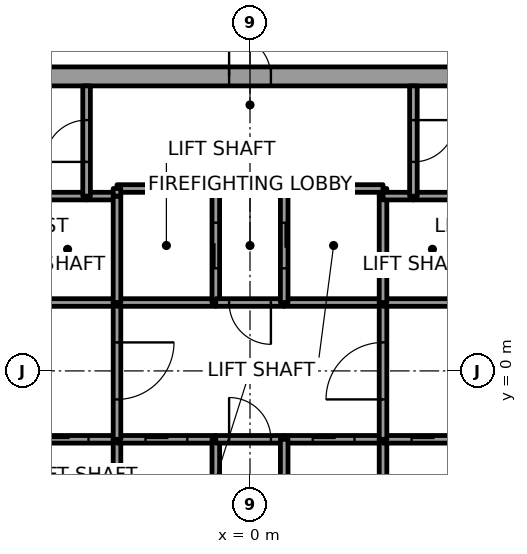
"""IFC4 building model, lengths in metres.
Left out: names, types, materials, properties, quantities, classifications, styles, units other than length and angle.
Written with IfcOpenShell. Run it as: python <this file> out.ifc"""

import sys

from ifc_helpers import new_model, si_unit, direction, frame, frame_2d, origin, place, context, subcontext, project, spatial, rectangle, extrude, element, fill, save


model = new_model("IFC4")
c1 = context("Model", 3, precision=1e-05, world=origin(), true_north=direction((0.0, 1.0)))
c2 = subcontext(c1, "Body", "Model", "MODEL_VIEW")
j1 = project(units=[si_unit("LENGTHUNIT", "METRE"), si_unit("PLANEANGLEUNIT", "RADIAN")], contexts=[c1])
p1 = place(None, origin())
s1 = spatial("IfcSite", under=j1, at=p1, CompositionType="ELEMENT")
p2 = place(p1, origin())
s2 = spatial("IfcBuilding", under=s1, at=p2, CompositionType="ELEMENT")
p3 = place(p2, frame((0.0, 0.0, 99.8)))
s3 = spatial("IfcBuildingStorey", under=s2, at=p3, CompositionType="ELEMENT", Elevation=99.8)
p4 = place(p3, frame((-11.0, 7.75, 0.0), z_axis=(0.0, 0.0, 1.0), x_axis=(1.0, 0.0, 0.0)))
e1 = element("IfcWall", 1, at=p4, inside=s3, PredefinedType="SHEAR", context=c2, shape_type="SweptSolid", body=[
    extrude(rectangle(XDim=22.0, YDim=0.5, at=frame_2d((11.0, 0.0))), origin(), (0.0, 0.0, 1.0), 3.7),
])
p5 = place(p4, frame((10.45, 0.0, 0.0)))
e2 = element("IfcOpeningElement", 2, at=p5, cuts=e1, PredefinedType="OPENING", context=c2, shape_type="SweptSolid", body=[
    extrude(rectangle(XDim=1.1, YDim=2.1, at=frame_2d((0.55, 1.05))), frame((0.0, 0.25, 0.0), z_axis=(0.0, -1.0, 0.0), x_axis=(1.0, 0.0, 0.0)), (0.0, 0.0, 1.0), 0.5),
])
p6 = place(p3, frame((-6.1, -1.8, 0.0), z_axis=(0.0, 0.0, 1.0), x_axis=(1.0, 0.0, 0.0)))
e3 = element("IfcWall", 3, at=p6, inside=s3, PredefinedType="SOLIDWALL", context=c2, shape_type="SweptSolid", body=[
    extrude(rectangle(XDim=2.6, YDim=0.2, at=frame_2d((1.3, 0.0))), origin(), (0.0, 0.0, 1.0), 3.55),
])
p7 = place(p6, frame((0.75, 0.0, 0.0)))
e4 = element("IfcOpeningElement", 4, at=p7, cuts=e3, PredefinedType="OPENING", context=c2, shape_type="SweptSolid", body=[
    extrude(rectangle(XDim=1.1, YDim=2.1, at=frame_2d((0.55, 1.05))), frame((0.0, 0.1, 0.0), z_axis=(0.0, -1.0, 0.0), x_axis=(1.0, 0.0, 0.0)), (0.0, 0.0, 1.0), 0.2),
])
p8 = place(p3, frame((-3.5, 1.8, 0.0), z_axis=(0.0, 0.0, 1.0), x_axis=(-1.0, 0.0, 0.0)))
e5 = element("IfcWall", 5, at=p8, inside=s3, PredefinedType="SOLIDWALL", context=c2, shape_type="SweptSolid", body=[
    extrude(rectangle(XDim=2.6, YDim=0.2, at=frame_2d((1.3, 0.0))), origin(), (0.0, 0.0, 1.0), 3.55),
])
p9 = place(p3, frame((-4.3, 4.6, 0.0), z_axis=(0.0, 0.0, 1.0), x_axis=(-1.0, 0.0, 0.0)))
e6 = element("IfcWall", 6, at=p9, inside=s3, PredefinedType="SOLIDWALL", context=c2, shape_type="SweptSolid", body=[
    extrude(rectangle(XDim=1.8, YDim=0.2, at=frame_2d((0.9, 0.0))), origin(), (0.0, 0.0, 1.0), 3.55),
])
p10 = place(p3, frame((-3.5, 4.6, 0.0), z_axis=(0.0, 0.0, 1.0), x_axis=(-1.0, 0.0, 0.0)))
e7 = element("IfcWall", 7, at=p10, inside=s3, PredefinedType="SOLIDWALL", context=c2, shape_type="SweptSolid", body=[
    extrude(rectangle(XDim=0.8, YDim=0.2, at=frame_2d((0.4, 0.0))), origin(), (0.0, 0.0, 1.0), 3.55),
])
p11 = place(p3, frame((-4.3, 4.6, 0.0), z_axis=(0.0, 0.0, 1.0), x_axis=(0.0, 1.0, 0.0)))
e8 = element("IfcWall", 8, at=p11, inside=s3, PredefinedType="SOLIDWALL", context=c2, shape_type="SweptSolid", body=[
    extrude(rectangle(XDim=2.9, YDim=0.2, at=frame_2d((1.45, 0.0))), origin(), (0.0, 0.0, 1.0), 3.55),
])
p12 = place(p11, frame((0.9, 0.0, 0.0)))
e9 = element("IfcOpeningElement", 9, at=p12, cuts=e8, PredefinedType="OPENING", context=c2, shape_type="SweptSolid", body=[
    extrude(rectangle(XDim=1.1, YDim=2.1, at=frame_2d((0.55, 1.05))), frame((0.0, 0.1, 0.0), z_axis=(0.0, -1.0, 0.0), x_axis=(1.0, 0.0, 0.0)), (0.0, 0.0, 1.0), 0.2),
])
p13 = place(p3, frame((-3.5, -4.6, 0.0), z_axis=(0.0, 0.0, 1.0), x_axis=(0.0, 1.0, 0.0)))
e10 = element("IfcWall", 10, at=p13, inside=s3, PredefinedType="SOLIDWALL", context=c2, shape_type="SweptSolid", body=[
    extrude(rectangle(XDim=2.8, YDim=0.2, at=frame_2d((1.4, 0.0))), origin(), (0.0, 0.0, 1.0), 3.55),
])
p14 = place(p3, frame((-3.5, -1.8, 0.0), z_axis=(0.0, 0.0, 1.0), x_axis=(1.0, 0.0, 0.0)))
e11 = element("IfcWall", 11, at=p14, inside=s3, PredefinedType="SOLIDWALL", context=c2, shape_type="SweptSolid", body=[
    extrude(rectangle(XDim=2.6, YDim=0.2, at=frame_2d((1.3, 0.0))), origin(), (0.0, 0.0, 1.0), 3.55),
])
p15 = place(p14, frame((0.75, 0.0, 0.0)))
e12 = element("IfcOpeningElement", 12, at=p15, cuts=e11, PredefinedType="OPENING", context=c2, shape_type="SweptSolid", body=[
    extrude(rectangle(XDim=1.1, YDim=2.1, at=frame_2d((0.55, 1.05))), frame((0.0, 0.1, 0.0), z_axis=(0.0, -1.0, 0.0), x_axis=(1.0, 0.0, 0.0)), (0.0, 0.0, 1.0), 0.2),
])
p16 = place(p3, frame((-3.5, 1.8, 0.0), z_axis=(0.0, 0.0, 1.0), x_axis=(0.0, -1.0, 0.0)))
e13 = element("IfcWall", 13, at=p16, inside=s3, PredefinedType="SOLIDWALL", context=c2, shape_type="SweptSolid", body=[
    extrude(rectangle(XDim=3.6, YDim=0.2, at=frame_2d((1.8, 0.0))), origin(), (0.0, 0.0, 1.0), 3.55),
])
p17 = place(p16, frame((1.05, 0.0, 0.0)))
e14 = element("IfcOpeningElement", 14, at=p17, cuts=e13, PredefinedType="OPENING", context=c2, shape_type="SweptSolid", body=[
    extrude(rectangle(XDim=1.5, YDim=2.1, at=frame_2d((0.75, 1.05))), frame((0.0, 0.1, 0.0), z_axis=(0.0, -1.0, 0.0), x_axis=(1.0, 0.0, 0.0)), (0.0, 0.0, 1.0), 0.2),
])
p18 = place(p3, frame((-0.9, 1.8, 0.0), z_axis=(0.0, 0.0, 1.0), x_axis=(-1.0, 0.0, 0.0)))
e15 = element("IfcWall", 15, at=p18, inside=s3, PredefinedType="SOLIDWALL", context=c2, shape_type="SweptSolid", body=[
    extrude(rectangle(XDim=2.6, YDim=0.2, at=frame_2d((1.3, 0.0))), origin(), (0.0, 0.0, 1.0), 3.55),
])
p19 = place(p3, frame((-3.5, 4.6, 0.0), z_axis=(0.0, 0.0, 1.0), x_axis=(0.0, -1.0, 0.0)))
e16 = element("IfcWall", 16, at=p19, inside=s3, PredefinedType="SOLIDWALL", context=c2, shape_type="SweptSolid", body=[
    extrude(rectangle(XDim=2.8, YDim=0.2, at=frame_2d((1.4, 0.0))), origin(), (0.0, 0.0, 1.0), 3.55),
])
p20 = place(p3, frame((-0.9, 1.8, 0.0), z_axis=(0.0, 0.0, 1.0), x_axis=(0.0, 1.0, 0.0)))
e17 = element("IfcWall", 17, at=p20, inside=s3, PredefinedType="SOLIDWALL", context=c2, shape_type="SweptSolid", body=[
    extrude(rectangle(XDim=3.0, YDim=0.2, at=frame_2d((1.5, 0.0))), origin(), (0.0, 0.0, 1.0), 3.55),
])
p21 = place(p20, frame((0.9, 0.0, 0.0)))
e18 = element("IfcOpeningElement", 18, at=p21, cuts=e17, PredefinedType="OPENING", context=c2, shape_type="SweptSolid", body=[
    extrude(rectangle(XDim=1.2, YDim=2.1, at=frame_2d((0.6, 1.05))), frame((0.0, 0.1, 0.0), z_axis=(0.0, -1.0, 0.0), x_axis=(1.0, 0.0, 0.0)), (0.0, 0.0, 1.0), 0.2),
])
p22 = place(p3, frame((-0.9, 4.8, 0.0), z_axis=(0.0, 0.0, 1.0), x_axis=(-1.0, 0.0, 0.0)))
e19 = element("IfcWall", 19, at=p22, inside=s3, PredefinedType="SOLIDWALL", context=c2, shape_type="SweptSolid", body=[
    extrude(rectangle(XDim=2.6, YDim=0.2, at=frame_2d((1.3, 0.0))), origin(), (0.0, 0.0, 1.0), 3.55),
])
p23 = place(p3, frame((-3.5, 4.8, 0.0), z_axis=(0.0, 0.0, 1.0), x_axis=(0.0, -1.0, 0.0)))
e20 = element("IfcWall", 20, at=p23, inside=s3, PredefinedType="SOLIDWALL", context=c2, shape_type="SweptSolid", body=[
    extrude(rectangle(XDim=0.2, YDim=0.2, at=frame_2d((0.1, 0.0))), origin(), (0.0, 0.0, 1.0), 3.55),
])
p24 = place(p3, frame((-0.9, -4.6, 0.0), z_axis=(0.0, 0.0, 1.0), x_axis=(0.0, 1.0, 0.0)))
e21 = element("IfcWall", 21, at=p24, inside=s3, PredefinedType="SOLIDWALL", context=c2, shape_type="SweptSolid", body=[
    extrude(rectangle(XDim=2.8, YDim=0.2, at=frame_2d((1.4, 0.0))), origin(), (0.0, 0.0, 1.0), 3.55),
])
p25 = place(p3, frame((-0.9, -1.8, 0.0), z_axis=(0.0, 0.0, 1.0), x_axis=(1.0, 0.0, 0.0)))
e22 = element("IfcWall", 22, at=p25, inside=s3, PredefinedType="SOLIDWALL", context=c2, shape_type="SweptSolid", body=[
    extrude(rectangle(XDim=1.8, YDim=0.2, at=frame_2d((0.9, 0.0))), origin(), (0.0, 0.0, 1.0), 3.55),
])
p26 = place(p25, frame((0.35, 0.0, 0.0)))
e23 = element("IfcOpeningElement", 23, at=p26, cuts=e22, PredefinedType="OPENING", context=c2, shape_type="SweptSolid", body=[
    extrude(rectangle(XDim=1.1, YDim=2.1, at=frame_2d((0.55, 1.05))), frame((0.0, 0.1, 0.0), z_axis=(0.0, -1.0, 0.0), x_axis=(1.0, 0.0, 0.0)), (0.0, 0.0, 1.0), 0.2),
])
p27 = place(p3, frame((0.9, 1.8, 0.0), z_axis=(0.0, 0.0, 1.0), x_axis=(-1.0, 0.0, 0.0)))
e24 = element("IfcWall", 24, at=p27, inside=s3, PredefinedType="SOLIDWALL", context=c2, shape_type="SweptSolid", body=[
    extrude(rectangle(XDim=1.8, YDim=0.2, at=frame_2d((0.9, 0.0))), origin(), (0.0, 0.0, 1.0), 3.55),
])
p28 = place(p27, frame((0.35, 0.0, 0.0)))
e25 = element("IfcOpeningElement", 25, at=p28, cuts=e24, PredefinedType="OPENING", context=c2, shape_type="SweptSolid", body=[
    extrude(rectangle(XDim=1.1, YDim=2.1, at=frame_2d((0.55, 1.05))), frame((0.0, 0.1, 0.0), z_axis=(0.0, -1.0, 0.0), x_axis=(1.0, 0.0, 0.0)), (0.0, 0.0, 1.0), 0.2),
])
p29 = place(p3, frame((0.9, -1.8, 0.0), z_axis=(0.0, 0.0, 1.0), x_axis=(1.0, 0.0, 0.0)))
e26 = element("IfcWall", 26, at=p29, inside=s3, PredefinedType="SOLIDWALL", context=c2, shape_type="SweptSolid", body=[
    extrude(rectangle(XDim=2.6, YDim=0.2, at=frame_2d((1.3, 0.0))), origin(), (0.0, 0.0, 1.0), 3.55),
])
p30 = place(p29, frame((0.75, 0.0, 0.0)))
e27 = element("IfcOpeningElement", 27, at=p30, cuts=e26, PredefinedType="OPENING", context=c2, shape_type="SweptSolid", body=[
    extrude(rectangle(XDim=1.1, YDim=2.1, at=frame_2d((0.55, 1.05))), frame((0.0, 0.1, 0.0), z_axis=(0.0, -1.0, 0.0), x_axis=(1.0, 0.0, 0.0)), (0.0, 0.0, 1.0), 0.2),
])
p31 = place(p3, frame((0.9, -1.8, 0.0), z_axis=(0.0, 0.0, 1.0), x_axis=(0.0, -1.0, 0.0)))
e28 = element("IfcWall", 28, at=p31, inside=s3, PredefinedType="SOLIDWALL", context=c2, shape_type="SweptSolid", body=[
    extrude(rectangle(XDim=2.8, YDim=0.2, at=frame_2d((1.4, 0.0))), origin(), (0.0, 0.0, 1.0), 3.55),
])
p32 = place(p3, frame((3.5, 1.8, 0.0), z_axis=(0.0, 0.0, 1.0), x_axis=(-1.0, 0.0, 0.0)))
e29 = element("IfcWall", 29, at=p32, inside=s3, PredefinedType="SOLIDWALL", context=c2, shape_type="SweptSolid", body=[
    extrude(rectangle(XDim=2.6, YDim=0.2, at=frame_2d((1.3, 0.0))), origin(), (0.0, 0.0, 1.0), 3.55),
])
p33 = place(p3, frame((3.5, 4.6, 0.0), z_axis=(0.0, 0.0, 1.0), x_axis=(0.0, 1.0, 0.0)))
e30 = element("IfcWall", 30, at=p33, inside=s3, PredefinedType="SOLIDWALL", context=c2, shape_type="SweptSolid", body=[
    extrude(rectangle(XDim=0.2, YDim=0.2, at=frame_2d((0.1, 0.0))), origin(), (0.0, 0.0, 1.0), 3.55),
])
p34 = place(p3, frame((3.5, 4.8, 0.0), z_axis=(0.0, 0.0, 1.0), x_axis=(-1.0, 0.0, 0.0)))
e31 = element("IfcWall", 31, at=p34, inside=s3, PredefinedType="SOLIDWALL", context=c2, shape_type="SweptSolid", body=[
    extrude(rectangle(XDim=2.6, YDim=0.2, at=frame_2d((1.3, 0.0))), origin(), (0.0, 0.0, 1.0), 3.55),
])
p35 = place(p3, frame((0.9, 4.8, 0.0), z_axis=(0.0, 0.0, 1.0), x_axis=(0.0, -1.0, 0.0)))
e32 = element("IfcWall", 32, at=p35, inside=s3, PredefinedType="SOLIDWALL", context=c2, shape_type="SweptSolid", body=[
    extrude(rectangle(XDim=3.0, YDim=0.2, at=frame_2d((1.5, 0.0))), origin(), (0.0, 0.0, 1.0), 3.55),
])
p36 = place(p35, frame((0.9, 0.0, 0.0)))
e33 = element("IfcOpeningElement", 33, at=p36, cuts=e32, PredefinedType="OPENING", context=c2, shape_type="SweptSolid", body=[
    extrude(rectangle(XDim=1.2, YDim=2.1, at=frame_2d((0.6, 1.05))), frame((0.0, 0.1, 0.0), z_axis=(0.0, -1.0, 0.0), x_axis=(1.0, 0.0, 0.0)), (0.0, 0.0, 1.0), 0.2),
])
p37 = place(p3, frame((3.5, -4.6, 0.0), z_axis=(0.0, 0.0, 1.0), x_axis=(0.0, 1.0, 0.0)))
e34 = element("IfcWall", 34, at=p37, inside=s3, PredefinedType="SOLIDWALL", context=c2, shape_type="SweptSolid", body=[
    extrude(rectangle(XDim=2.8, YDim=0.2, at=frame_2d((1.4, 0.0))), origin(), (0.0, 0.0, 1.0), 3.55),
])
p38 = place(p3, frame((3.5, -1.8, 0.0), z_axis=(0.0, 0.0, 1.0), x_axis=(1.0, 0.0, 0.0)))
e35 = element("IfcWall", 35, at=p38, inside=s3, PredefinedType="SOLIDWALL", context=c2, shape_type="SweptSolid", body=[
    extrude(rectangle(XDim=2.6, YDim=0.2, at=frame_2d((1.3, 0.0))), origin(), (0.0, 0.0, 1.0), 3.55),
])
p39 = place(p38, frame((0.75, 0.0, 0.0)))
e36 = element("IfcOpeningElement", 36, at=p39, cuts=e35, PredefinedType="OPENING", context=c2, shape_type="SweptSolid", body=[
    extrude(rectangle(XDim=1.1, YDim=2.1, at=frame_2d((0.55, 1.05))), frame((0.0, 0.1, 0.0), z_axis=(0.0, -1.0, 0.0), x_axis=(1.0, 0.0, 0.0)), (0.0, 0.0, 1.0), 0.2),
])
p40 = place(p3, frame((3.5, -1.8, 0.0), z_axis=(0.0, 0.0, 1.0), x_axis=(0.0, 1.0, 0.0)))
e37 = element("IfcWall", 37, at=p40, inside=s3, PredefinedType="SOLIDWALL", context=c2, shape_type="SweptSolid", body=[
    extrude(rectangle(XDim=3.6, YDim=0.2, at=frame_2d((1.8, 0.0))), origin(), (0.0, 0.0, 1.0), 3.55),
])
p41 = place(p40, frame((1.05, 0.0, 0.0)))
e38 = element("IfcOpeningElement", 38, at=p41, cuts=e37, PredefinedType="OPENING", context=c2, shape_type="SweptSolid", body=[
    extrude(rectangle(XDim=1.5, YDim=2.1, at=frame_2d((0.75, 1.05))), frame((0.0, 0.1, 0.0), z_axis=(0.0, -1.0, 0.0), x_axis=(1.0, 0.0, 0.0)), (0.0, 0.0, 1.0), 0.2),
])
p42 = place(p3, frame((6.1, 1.8, 0.0), z_axis=(0.0, 0.0, 1.0), x_axis=(-1.0, 0.0, 0.0)))
e39 = element("IfcWall", 39, at=p42, inside=s3, PredefinedType="SOLIDWALL", context=c2, shape_type="SweptSolid", body=[
    extrude(rectangle(XDim=2.6, YDim=0.2, at=frame_2d((1.3, 0.0))), origin(), (0.0, 0.0, 1.0), 3.55),
])
p43 = place(p3, frame((3.5, 1.8, 0.0), z_axis=(0.0, 0.0, 1.0), x_axis=(0.0, 1.0, 0.0)))
e40 = element("IfcWall", 40, at=p43, inside=s3, PredefinedType="SOLIDWALL", context=c2, shape_type="SweptSolid", body=[
    extrude(rectangle(XDim=2.8, YDim=0.2, at=frame_2d((1.4, 0.0))), origin(), (0.0, 0.0, 1.0), 3.55),
])
p44 = place(p3, frame((4.3, 4.6, 0.0), z_axis=(0.0, 0.0, 1.0), x_axis=(-1.0, 0.0, 0.0)))
e41 = element("IfcWall", 41, at=p44, inside=s3, PredefinedType="SOLIDWALL", context=c2, shape_type="SweptSolid", body=[
    extrude(rectangle(XDim=0.8, YDim=0.2, at=frame_2d((0.4, 0.0))), origin(), (0.0, 0.0, 1.0), 3.55),
])
p45 = place(p3, frame((6.1, 4.6, 0.0), z_axis=(0.0, 0.0, 1.0), x_axis=(-1.0, 0.0, 0.0)))
e42 = element("IfcWall", 42, at=p45, inside=s3, PredefinedType="SOLIDWALL", context=c2, shape_type="SweptSolid", body=[
    extrude(rectangle(XDim=1.8, YDim=0.2, at=frame_2d((0.9, 0.0))), origin(), (0.0, 0.0, 1.0), 3.55),
])
p46 = place(p3, frame((4.3, 7.5, 0.0), z_axis=(0.0, 0.0, 1.0), x_axis=(0.0, -1.0, 0.0)))
e43 = element("IfcWall", 43, at=p46, inside=s3, PredefinedType="SOLIDWALL", context=c2, shape_type="SweptSolid", body=[
    extrude(rectangle(XDim=2.9, YDim=0.2, at=frame_2d((1.45, 0.0))), origin(), (0.0, 0.0, 1.0), 3.55),
])
p47 = place(p46, frame((0.9, 0.0, 0.0)))
e44 = element("IfcOpeningElement", 44, at=p47, cuts=e43, PredefinedType="OPENING", context=c2, shape_type="SweptSolid", body=[
    extrude(rectangle(XDim=1.1, YDim=2.1, at=frame_2d((0.55, 1.05))), frame((0.0, 0.1, 0.0), z_axis=(0.0, -1.0, 0.0), x_axis=(1.0, 0.0, 0.0)), (0.0, 0.0, 1.0), 0.2),
])
p48 = place(p7, origin())
e45 = element("IfcDoor", 45, at=p48, inside=s3, OperationType="SLIDING_TO_LEFT", PredefinedType="DOOR", context=c2, shape_type="SweptSolid", body=[
    extrude(rectangle(XDim=1.1, YDim=2.1, at=frame_2d((0.55, 1.05))), frame((0.0, 0.025, 0.0), z_axis=(0.0, -1.0, 0.0), x_axis=(1.0, 0.0, 0.0)), (0.0, 0.0, 1.0), 0.05),
])
fill(e4, e45)
p49 = place(p15, origin())
e46 = element("IfcDoor", 46, at=p49, inside=s3, OperationType="SLIDING_TO_LEFT", PredefinedType="DOOR", context=c2, shape_type="SweptSolid", body=[
    extrude(rectangle(XDim=1.1, YDim=2.1, at=frame_2d((0.55, 1.05))), frame((0.0, 0.025, 0.0), z_axis=(0.0, -1.0, 0.0), x_axis=(1.0, 0.0, 0.0)), (0.0, 0.0, 1.0), 0.05),
])
fill(e12, e46)
p50 = place(p30, origin())
e47 = element("IfcDoor", 47, at=p50, inside=s3, OperationType="SLIDING_TO_RIGHT", PredefinedType="DOOR", context=c2, shape_type="SweptSolid", body=[
    extrude(rectangle(XDim=1.1, YDim=2.1, at=frame_2d((0.55, 1.05))), frame((0.0, 0.025, 0.0), z_axis=(0.0, -1.0, 0.0), x_axis=(1.0, 0.0, 0.0)), (0.0, 0.0, 1.0), 0.05),
])
fill(e27, e47)
p51 = place(p39, origin())
e48 = element("IfcDoor", 48, at=p51, inside=s3, OperationType="SLIDING_TO_LEFT", PredefinedType="DOOR", context=c2, shape_type="SweptSolid", body=[
    extrude(rectangle(XDim=1.1, YDim=2.1, at=frame_2d((0.55, 1.05))), frame((0.0, 0.025, 0.0), z_axis=(0.0, -1.0, 0.0), x_axis=(1.0, 0.0, 0.0)), (0.0, 0.0, 1.0), 0.05),
])
fill(e36, e48)
p52 = place(p21, origin())
e49 = element("IfcDoor", 49, at=p52, inside=s3, OperationType="SLIDING_TO_RIGHT", PredefinedType="DOOR", context=c2, shape_type="SweptSolid", body=[
    extrude(rectangle(XDim=1.2, YDim=2.1, at=frame_2d((0.6, 1.05))), frame((0.0, 0.025, 0.0), z_axis=(0.0, -1.0, 0.0), x_axis=(1.0, 0.0, 0.0)), (0.0, 0.0, 1.0), 0.05),
])
fill(e18, e49)
p53 = place(p36, origin())
e50 = element("IfcDoor", 50, at=p53, inside=s3, OperationType="SLIDING_TO_RIGHT", PredefinedType="DOOR", context=c2, shape_type="SweptSolid", body=[
    extrude(rectangle(XDim=1.2, YDim=2.1, at=frame_2d((0.6, 1.05))), frame((0.0, 0.025, 0.0), z_axis=(0.0, -1.0, 0.0), x_axis=(1.0, 0.0, 0.0)), (0.0, 0.0, 1.0), 0.05),
])
fill(e33, e50)
p54 = place(p17, origin())
e51 = element("IfcDoor", 51, at=p54, inside=s3, OperationType="DOUBLE_DOOR_SINGLE_SWING", PredefinedType="DOOR", context=c2, shape_type="SweptSolid", body=[
    extrude(rectangle(XDim=1.5, YDim=2.1, at=frame_2d((0.75, 1.05))), frame((0.0, 0.025, 0.0), z_axis=(0.0, -1.0, 0.0), x_axis=(1.0, 0.0, 0.0)), (0.0, 0.0, 1.0), 0.05),
])
fill(e14, e51)
p55 = place(p41, origin())
e52 = element("IfcDoor", 52, at=p55, inside=s3, OperationType="DOUBLE_DOOR_SINGLE_SWING", PredefinedType="DOOR", context=c2, shape_type="SweptSolid", body=[
    extrude(rectangle(XDim=1.5, YDim=2.1, at=frame_2d((0.75, 1.05))), frame((0.0, 0.025, 0.0), z_axis=(0.0, -1.0, 0.0), x_axis=(1.0, 0.0, 0.0)), (0.0, 0.0, 1.0), 0.05),
])
fill(e38, e52)
p56 = place(p28, origin())
e53 = element("IfcDoor", 53, at=p56, inside=s3, OperationType="SINGLE_SWING_RIGHT", PredefinedType="DOOR", context=c2, shape_type="SweptSolid", body=[
    extrude(rectangle(XDim=1.1, YDim=2.1, at=frame_2d((0.55, 1.05))), frame((0.0, 0.025, 0.0), z_axis=(0.0, -1.0, 0.0), x_axis=(1.0, 0.0, 0.0)), (0.0, 0.0, 1.0), 0.05),
])
fill(e25, e53)
p57 = place(p26, origin())
e54 = element("IfcDoor", 54, at=p57, inside=s3, OperationType="SINGLE_SWING_LEFT", PredefinedType="DOOR", context=c2, shape_type="SweptSolid", body=[
    extrude(rectangle(XDim=1.1, YDim=2.1, at=frame_2d((0.55, 1.05))), frame((0.0, 0.025, 0.0), z_axis=(0.0, -1.0, 0.0), x_axis=(1.0, 0.0, 0.0)), (0.0, 0.0, 1.0), 0.05),
])
fill(e23, e54)
p58 = place(p12, origin())
e55 = element("IfcDoor", 55, at=p58, inside=s3, OperationType="SINGLE_SWING_RIGHT", PredefinedType="DOOR", context=c2, shape_type="SweptSolid", body=[
    extrude(rectangle(XDim=1.1, YDim=2.1, at=frame_2d((0.55, 1.05))), frame((0.0, 0.025, 0.0), z_axis=(0.0, -1.0, 0.0), x_axis=(1.0, 0.0, 0.0)), (0.0, 0.0, 1.0), 0.05),
])
fill(e9, e55)
p59 = place(p47, origin())
e56 = element("IfcDoor", 56, at=p59, inside=s3, OperationType="SINGLE_SWING_LEFT", PredefinedType="DOOR", context=c2, shape_type="SweptSolid", body=[
    extrude(rectangle(XDim=1.1, YDim=2.1, at=frame_2d((0.55, 1.05))), frame((0.0, 0.025, 0.0), z_axis=(0.0, -1.0, 0.0), x_axis=(1.0, 0.0, 0.0)), (0.0, 0.0, 1.0), 0.05),
])
fill(e44, e56)
p60 = place(p5, origin())
e57 = element("IfcDoor", 57, at=p60, inside=s3, OperationType="SINGLE_SWING_LEFT", PredefinedType="DOOR", context=c2, shape_type="SweptSolid", body=[
    extrude(rectangle(XDim=1.1, YDim=2.1, at=frame_2d((0.55, 1.05))), frame((0.0, 0.025, 0.0), z_axis=(0.0, -1.0, 0.0), x_axis=(1.0, 0.0, 0.0)), (0.0, 0.0, 1.0), 0.05),
])
fill(e2, e57)
save(model, sys.argv[1])
